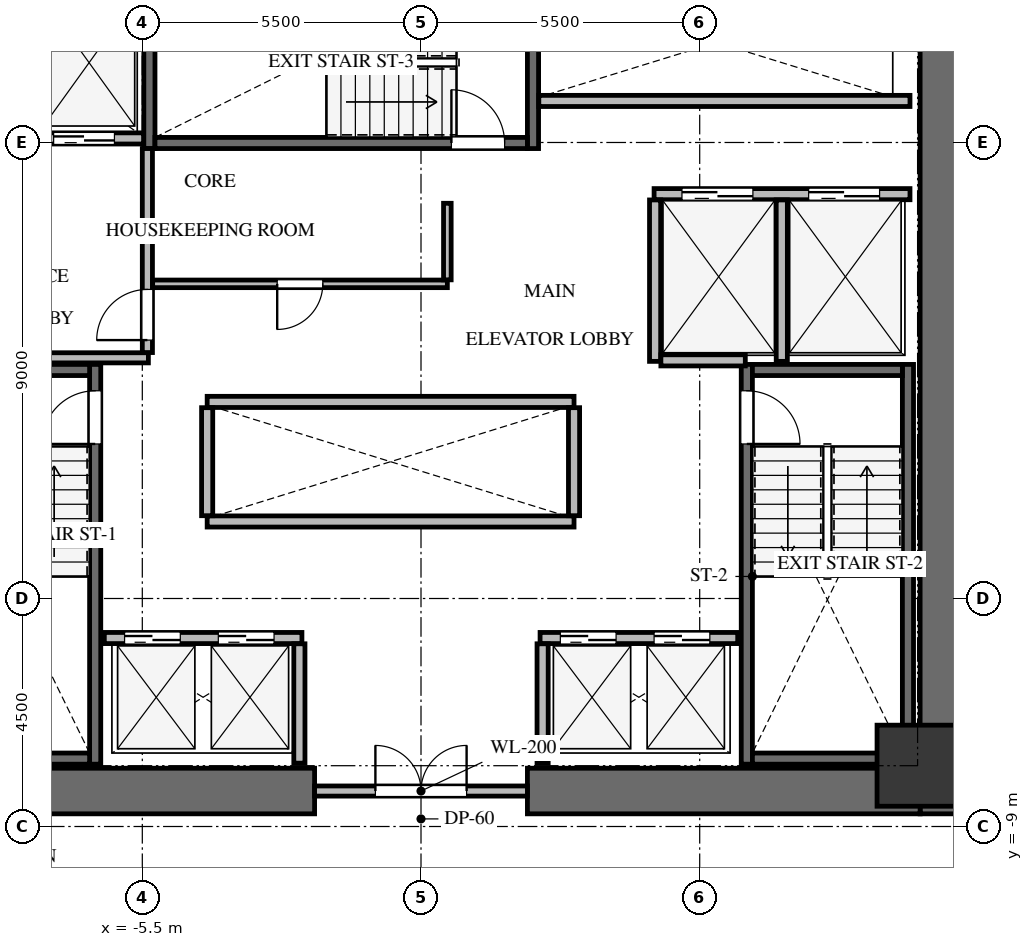
"""IFC4 building model, lengths in metres.
Left out: names, types, materials, properties, quantities, classifications, styles, units other than length and angle.
Written with IfcOpenShell. Run it as: python <this file> out.ifc"""

import sys

from ifc_helpers import new_model, si_unit, direction, frame, frame_2d, origin, origin_2d, place, context, subcontext, project, spatial, rectangle, extrude, source, transform, mapped, element, fill, save


model = new_model("IFC4")
c1 = context("Model", 3, precision=1e-05, world=origin(), true_north=direction((0.0, 1.0)))
c2 = subcontext(c1, "Body", "Model", "MODEL_VIEW")
j1 = project(units=[si_unit("LENGTHUNIT", "METRE"), si_unit("PLANEANGLEUNIT", "RADIAN")], contexts=[c1])
p1 = place(None, origin())
s1 = spatial("IfcSite", under=j1, at=p1, CompositionType="ELEMENT")
p2 = place(p1, origin())
s2 = spatial("IfcBuilding", under=s1, at=p2, CompositionType="ELEMENT")
p3 = place(p2, frame((0.0, 0.0, 72.0)))
s3 = spatial("IfcBuildingStorey", under=s2, at=p3, CompositionType="ELEMENT", Elevation=72.0)
p4 = place(p3, frame((10.3, -8.75, 0.0), z_axis=(0.0, 0.0, 1.0), x_axis=(0.0, 1.0, 0.0)))
e1 = element("IfcWall", 1, at=p4, inside=s3, PredefinedType="SHEAR", context=c2, shape_type="SweptSolid", body=[
    extrude(rectangle(XDim=17.5, YDim=0.9, at=frame_2d((8.75, 0.0))), origin(), (0.0, 0.0, 1.0), 3.3),
])
for number, where, z_axis, x_axis in (
    (2, (-9.85, -8.3, 0.0), (0.0, 0.0, 1.0), (1.0, 0.0, 0.0)),
    (3, (2.1, -8.3, 0.0), (0.0, 0.0, 1.0), (1.0, 0.0, 0.0)),
):
    element("IfcWall", number, at=place(p3, frame(where, z_axis=z_axis, x_axis=x_axis)), inside=s3, PredefinedType="SHEAR", context=c2, shape_type="SweptSolid", body=[
        extrude(rectangle(XDim=7.75, YDim=0.9, at=frame_2d((3.875, 0.0))), origin(), (0.0, 0.0, 1.0), 3.3),
    ])
p5 = place(p3, frame((-6.43, -7.77, -0.24), z_axis=(0.0, 0.0, 1.0), x_axis=(0.0, 1.0, 0.0)))
e4 = element("IfcWall", 4, at=p5, inside=s3, PredefinedType="SHEAR", context=c2, shape_type="SweptSolid", body=[
    extrude(rectangle(XDim=7.89, YDim=0.22, at=frame_2d((3.945, 0.0))), origin(), (0.0, 0.0, 1.0), 3.3),
])
p6 = place(p5, frame((6.32, 0.0, 0.0)))
e5 = element("IfcOpeningElement", 5, at=p6, cuts=e4, PredefinedType="OPENING", context=c2, shape_type="SweptSolid", body=[
    extrude(rectangle(XDim=1.05, YDim=2.15, at=frame_2d((0.525, 1.075))), frame((0.0, 0.12, 0.0), z_axis=(0.0, -1.0, 0.0), x_axis=(1.0, 0.0, 0.0)), (0.0, 0.0, 1.0), 0.24),
])
for number, where, z_axis, x_axis in (
    (6, (-9.5, -7.66, -0.24), (0.0, 0.0, 1.0), (1.0, 0.0, 0.0)),
    (7, (-6.54, 0.01, -0.24), (0.0, 0.0, 1.0), (-1.0, 0.0, 0.0)),
):
    element("IfcWall", number, at=place(p3, frame(where, z_axis=z_axis, x_axis=x_axis)), inside=s3, PredefinedType="SHEAR", context=c2, shape_type="SweptSolid", body=[
        extrude(rectangle(XDim=2.96, YDim=0.22, at=frame_2d((1.48, 0.0))), origin(), (0.0, 0.0, 1.0), 3.3),
    ])
p7 = place(p3, frame((9.61, -7.77, -0.24), z_axis=(0.0, 0.0, 1.0), x_axis=(0.0, 1.0, 0.0)))
e8 = element("IfcWall", 8, at=p7, inside=s3, PredefinedType="SHEAR", context=c2, shape_type="SweptSolid", body=[
    extrude(rectangle(XDim=7.89, YDim=0.22, at=frame_2d((3.945, 0.0))), origin(), (0.0, 0.0, 1.0), 3.3),
])
p8 = place(p3, frame((6.43, 0.12, -0.24), z_axis=(0.0, 0.0, 1.0), x_axis=(0.0, -1.0, 0.0)))
e9 = element("IfcWall", 9, at=p8, inside=s3, PredefinedType="SHEAR", context=c2, shape_type="SweptSolid", body=[
    extrude(rectangle(XDim=7.89, YDim=0.22, at=frame_2d((3.945, 0.0))), origin(), (0.0, 0.0, 1.0), 3.3),
])
p9 = place(p8, frame((0.52, 0.0, 0.0)))
e10 = element("IfcOpeningElement", 10, at=p9, cuts=e9, PredefinedType="OPENING", context=c2, shape_type="SweptSolid", body=[
    extrude(rectangle(XDim=1.05, YDim=2.15, at=frame_2d((0.525, 1.075))), frame((0.0, 0.12, 0.0), z_axis=(0.0, -1.0, 0.0), x_axis=(1.0, 0.0, 0.0)), (0.0, 0.0, 1.0), 0.24),
])
for number, where, z_axis, x_axis in (
    (11, (6.54, -7.66, -0.24), (0.0, 0.0, 1.0), (1.0, 0.0, 0.0)),
    (12, (9.5, 0.01, -0.24), (0.0, 0.0, 1.0), (-1.0, 0.0, 0.0)),
):
    element("IfcWall", number, at=place(p3, frame(where, z_axis=z_axis, x_axis=x_axis)), inside=s3, PredefinedType="SHEAR", context=c2, shape_type="SweptSolid", body=[
        extrude(rectangle(XDim=2.96, YDim=0.22, at=frame_2d((1.48, 0.0))), origin(), (0.0, 0.0, 1.0), 3.3),
    ])
for number, where, z_axis, x_axis in (
    (13, (2.21, 4.38, -0.24), (0.0, 0.0, 1.0), (0.0, 1.0, 0.0)),
    (14, (-5.36, 7.78, -0.24), (0.0, 0.0, 1.0), (0.0, -1.0, 0.0)),
):
    element("IfcWall", number, at=place(p3, frame(where, z_axis=z_axis, x_axis=x_axis)), inside=s3, PredefinedType="SHEAR", context=c2, shape_type="SweptSolid", body=[
        extrude(rectangle(XDim=3.4, YDim=0.22, at=frame_2d((1.7, 0.0))), origin(), (0.0, 0.0, 1.0), 3.3),
    ])
p10 = place(p3, frame((-5.25, 4.49, -0.24), z_axis=(0.0, 0.0, 1.0), x_axis=(1.0, 0.0, 0.0)))
e15 = element("IfcWall", 15, at=p10, inside=s3, PredefinedType="SHEAR", context=c2, shape_type="SweptSolid", body=[
    extrude(rectangle(XDim=7.35, YDim=0.22, at=frame_2d((3.675, 0.0))), origin(), (0.0, 0.0, 1.0), 3.3),
])
p11 = place(p10, frame((5.85, 0.0, 0.0)))
e16 = element("IfcOpeningElement", 16, at=p11, cuts=e15, PredefinedType="OPENING", context=c2, shape_type="SweptSolid", body=[
    extrude(rectangle(XDim=1.05, YDim=2.15, at=frame_2d((0.525, 1.075))), frame((0.0, 0.12, 0.0), z_axis=(0.0, -1.0, 0.0), x_axis=(1.0, 0.0, 0.0)), (0.0, 0.0, 1.0), 0.24),
])
m1 = source(origin(), c2, "Body", "SweptSolid", [
    extrude(rectangle(XDim=1.6, YDim=1.6, at=origin_2d()), origin(), (0.0, 0.0, 1.0), 3.3),
])
p12 = place(p3, frame((9.8, -7.8, -0.24), z_axis=(0.0, 0.0, 1.0), x_axis=(1.0, 0.0, 0.0)))
e17 = element("IfcColumn", 17, at=p12, inside=s3, PredefinedType="COLUMN", context=c2, shape_type="MappedRepresentation", body=[
    mapped(m1, transform((0.0, 0.0, 0.0), x_axis=(1.0, 0.0, 0.0), y_axis=(0.0, 1.0, 0.0), z_axis=(0.0, 0.0, 1.0), scale=1.0)),
])
p13 = place(p3, frame((-2.1, -8.3, 0.0), z_axis=(0.0, 0.0, 1.0), x_axis=(1.0, 0.0, 0.0)))
e18 = element("IfcWall", 18, at=p13, inside=s3, PredefinedType="SOLIDWALL", context=c2, shape_type="SweptSolid", body=[
    extrude(rectangle(XDim=4.2, YDim=0.2, at=frame_2d((2.1, 0.0))), origin(), (0.0, 0.0, 1.0), 3.045),
])
p14 = place(p13, frame((1.2, 0.0, 0.0)))
e19 = element("IfcOpeningElement", 19, at=p14, cuts=e18, PredefinedType="OPENING", context=c2, shape_type="SweptSolid", body=[
    extrude(rectangle(XDim=1.8, YDim=2.15, at=frame_2d((0.9, 1.075))), frame((0.0, 0.11, 0.0), z_axis=(0.0, -1.0, 0.0), x_axis=(1.0, 0.0, 0.0)), (0.0, 0.0, 1.0), 0.22),
])
p15 = place(p3, frame((-9.65, 4.58, 0.0), z_axis=(0.0, 0.0, 1.0), x_axis=(1.0, 0.0, 0.0)))
e20 = element("IfcWall", 20, at=p15, inside=s3, PredefinedType="SOLIDWALL", context=c2, shape_type="SweptSolid", body=[
    extrude(rectangle(XDim=4.175, YDim=0.22, at=frame_2d((2.087, 0.0))), origin(), (0.0, 0.0, 1.0), 3.045),
])
p16 = place(p15, frame((0.4, 0.0, 0.0)))
e21 = element("IfcOpeningElement", 21, at=p16, cuts=e20, PredefinedType="OPENING", context=c2, shape_type="SweptSolid", body=[
    extrude(rectangle(XDim=1.2, YDim=2.15, at=frame_2d((0.6, 1.075))), frame((0.0, 0.12, 0.0), z_axis=(0.0, -1.0, 0.0), x_axis=(1.0, 0.0, 0.0)), (0.0, 0.0, 1.0), 0.24),
])
p17 = place(p15, frame((2.4, 0.0, 0.0)))
e22 = element("IfcOpeningElement", 22, at=p17, cuts=e20, PredefinedType="OPENING", context=c2, shape_type="SweptSolid", body=[
    extrude(rectangle(XDim=1.2, YDim=2.15, at=frame_2d((0.6, 1.075))), frame((0.0, 0.12, 0.0), z_axis=(0.0, -1.0, 0.0), x_axis=(1.0, 0.0, 0.0)), (0.0, 0.0, 1.0), 0.24),
])
p18 = place(p3, frame((-9.65, 0.25, 0.0), z_axis=(0.0, 0.0, 1.0), x_axis=(1.0, 0.0, 0.0)))
e23 = element("IfcWall", 23, at=p18, inside=s3, PredefinedType="SOLIDWALL", context=c2, shape_type="SweptSolid", body=[
    extrude(rectangle(XDim=4.27, YDim=0.2, at=frame_2d((2.135, 0.0))), origin(), (0.0, 0.0, 1.0), 3.045),
])
p19 = place(p3, frame((-5.4, 0.354, 0.0), z_axis=(0.0, 0.0, 1.0), x_axis=(0.0, 1.0, 0.0)))
e24 = element("IfcWall", 24, at=p19, inside=s3, PredefinedType="SOLIDWALL", context=c2, shape_type="SweptSolid", body=[
    extrude(rectangle(XDim=4.026, YDim=0.2, at=frame_2d((2.013, 0.0))), origin(), (0.0, 0.0, 1.0), 3.045),
])
p20 = place(p19, frame((0.246, 0.0, 0.0)))
e25 = element("IfcOpeningElement", 25, at=p20, cuts=e24, PredefinedType="OPENING", context=c2, shape_type="SweptSolid", body=[
    extrude(rectangle(XDim=1.0, YDim=2.15, at=frame_2d((0.5, 1.075))), frame((0.0, 0.11, 0.0), z_axis=(0.0, -1.0, 0.0), x_axis=(1.0, 0.0, 0.0)), (0.0, 0.0, 1.0), 0.22),
])
p21 = place(p3, frame((4.6, 3.48, 0.0), z_axis=(0.0, 0.0, 1.0), x_axis=(1.0, 0.0, 0.0)))
e26 = element("IfcWall", 26, at=p21, inside=s3, PredefinedType="SOLIDWALL", context=c2, shape_type="SweptSolid", body=[
    extrude(rectangle(XDim=5.05, YDim=0.22, at=frame_2d((2.525, 0.0))), origin(), (0.0, 0.0, 1.0), 3.045),
])
p22 = place(p21, frame((0.55, 0.0, 0.0)))
e27 = element("IfcOpeningElement", 27, at=p22, cuts=e26, PredefinedType="OPENING", context=c2, shape_type="SweptSolid", body=[
    extrude(rectangle(XDim=1.4, YDim=2.15, at=frame_2d((0.7, 1.075))), frame((0.0, 0.12, 0.0), z_axis=(0.0, -1.0, 0.0), x_axis=(1.0, 0.0, 0.0)), (0.0, 0.0, 1.0), 0.24),
])
p23 = place(p21, frame((3.05, 0.0, 0.0)))
e28 = element("IfcOpeningElement", 28, at=p23, cuts=e26, PredefinedType="OPENING", context=c2, shape_type="SweptSolid", body=[
    extrude(rectangle(XDim=1.4, YDim=2.15, at=frame_2d((0.7, 1.075))), frame((0.0, 0.12, 0.0), z_axis=(0.0, -1.0, 0.0), x_axis=(1.0, 0.0, 0.0)), (0.0, 0.0, 1.0), 0.24),
])
for number, where, z_axis, x_axis in (
    (29, (4.62, 0.18, 0.0), (0.0, 0.0, 1.0), (0.0, 1.0, 0.0)),
    (30, (7.12, 0.18, 0.0), (0.0, 0.0, 1.0), (0.0, 1.0, 0.0)),
):
    element("IfcWall", number, at=place(p3, frame(where, z_axis=z_axis, x_axis=x_axis)), inside=s3, PredefinedType="SOLIDWALL", context=c2, shape_type="SweptSolid", body=[
        extrude(rectangle(XDim=3.186, YDim=0.22, at=frame_2d((1.593, 0.0))), origin(), (0.0, 0.0, 1.0), 3.045),
    ])
p24 = place(p3, frame((4.734, 0.2, 0.0), z_axis=(0.0, 0.0, 1.0), x_axis=(1.0, 0.0, 0.0)))
e31 = element("IfcWall", 31, at=p24, inside=s3, PredefinedType="SOLIDWALL", context=c2, shape_type="SweptSolid", body=[
    extrude(rectangle(XDim=1.666, YDim=0.22, at=frame_2d((0.833, 0.0))), origin(), (0.0, 0.0, 1.0), 3.045),
])
p25 = place(p3, frame((-6.25, -5.28, 0.0), z_axis=(0.0, 0.0, 1.0), x_axis=(1.0, 0.0, 0.0)))
e32 = element("IfcWall", 32, at=p25, inside=s3, PredefinedType="SOLIDWALL", context=c2, shape_type="SweptSolid", body=[
    extrude(rectangle(XDim=3.9, YDim=0.22, at=frame_2d((1.95, 0.0))), origin(), (0.0, 0.0, 1.0), 3.045),
])
p26 = place(p25, frame((0.4, 0.0, 0.0)))
e33 = element("IfcOpeningElement", 33, at=p26, cuts=e32, PredefinedType="OPENING", context=c2, shape_type="SweptSolid", body=[
    extrude(rectangle(XDim=1.1, YDim=2.15, at=frame_2d((0.55, 1.075))), frame((0.0, 0.12, 0.0), z_axis=(0.0, -1.0, 0.0), x_axis=(1.0, 0.0, 0.0)), (0.0, 0.0, 1.0), 0.24),
])
p27 = place(p25, frame((2.25, 0.0, 0.0)))
e34 = element("IfcOpeningElement", 34, at=p27, cuts=e32, PredefinedType="OPENING", context=c2, shape_type="SweptSolid", body=[
    extrude(rectangle(XDim=1.1, YDim=2.15, at=frame_2d((0.55, 1.075))), frame((0.0, 0.12, 0.0), z_axis=(0.0, -1.0, 0.0), x_axis=(1.0, 0.0, 0.0)), (0.0, 0.0, 1.0), 0.24),
])
p28 = place(p3, frame((2.35, -5.28, 0.0), z_axis=(0.0, 0.0, 1.0), x_axis=(1.0, 0.0, 0.0)))
e35 = element("IfcWall", 35, at=p28, inside=s3, PredefinedType="SOLIDWALL", context=c2, shape_type="SweptSolid", body=[
    extrude(rectangle(XDim=3.9, YDim=0.22, at=frame_2d((1.95, 0.0))), origin(), (0.0, 0.0, 1.0), 3.045),
])
p29 = place(p28, frame((0.4, 0.0, 0.0)))
e36 = element("IfcOpeningElement", 36, at=p29, cuts=e35, PredefinedType="OPENING", context=c2, shape_type="SweptSolid", body=[
    extrude(rectangle(XDim=1.1, YDim=2.15, at=frame_2d((0.55, 1.075))), frame((0.0, 0.12, 0.0), z_axis=(0.0, -1.0, 0.0), x_axis=(1.0, 0.0, 0.0)), (0.0, 0.0, 1.0), 0.24),
])
p30 = place(p28, frame((2.25, 0.0, 0.0)))
e37 = element("IfcOpeningElement", 37, at=p30, cuts=e35, PredefinedType="OPENING", context=c2, shape_type="SweptSolid", body=[
    extrude(rectangle(XDim=1.1, YDim=2.15, at=frame_2d((0.55, 1.075))), frame((0.0, 0.12, 0.0), z_axis=(0.0, -1.0, 0.0), x_axis=(1.0, 0.0, 0.0)), (0.0, 0.0, 1.0), 0.24),
])
for number, where, z_axis, x_axis in (
    (38, (-2.4, -7.75, 0.0), (0.0, 0.0, 1.0), (0.0, 1.0, 0.0)),
    (39, (2.4, -7.75, 0.0), (0.0, 0.0, 1.0), (0.0, 1.0, 0.0)),
):
    element("IfcWall", number, at=place(p3, frame(where, z_axis=z_axis, x_axis=x_axis)), inside=s3, PredefinedType="SOLIDWALL", context=c2, shape_type="SweptSolid", body=[
        extrude(rectangle(XDim=2.356, YDim=0.22, at=frame_2d((1.178, 0.0))), origin(), (0.0, 0.0, 1.0), 3.045),
    ])
for number, where, z_axis, x_axis in (
    (40, (-4.22, -2.98, 0.0), (0.0, 0.0, 1.0), (1.0, 0.0, 0.0)),
    (41, (-4.22, -0.62, 0.0), (0.0, 0.0, 1.0), (1.0, 0.0, 0.0)),
):
    element("IfcWall", number, at=place(p3, frame(where, z_axis=z_axis, x_axis=x_axis)), inside=s3, PredefinedType="SOLIDWALL", context=c2, shape_type="SweptSolid", body=[
        extrude(rectangle(XDim=7.24, YDim=0.22, at=frame_2d((3.62, 0.0))), origin(), (0.0, 0.0, 1.0), 3.045),
    ])
for number, where, z_axis, x_axis in (
    (42, (-4.22, -2.866, 0.0), (0.0, 0.0, 1.0), (0.0, 1.0, 0.0)),
    (43, (3.02, -2.866, 0.0), (0.0, 0.0, 1.0), (0.0, 1.0, 0.0)),
):
    element("IfcWall", number, at=place(p3, frame(where, z_axis=z_axis, x_axis=x_axis)), inside=s3, PredefinedType="SOLIDWALL", context=c2, shape_type="SweptSolid", body=[
        extrude(rectangle(XDim=2.132, YDim=0.22, at=frame_2d((1.066, 0.0))), origin(), (0.0, 0.0, 1.0), 3.045),
    ])
p31 = place(p3, frame((2.325, 5.32, 0.0), z_axis=(0.0, 0.0, 1.0), x_axis=(1.0, 0.0, 0.0)))
e44 = element("IfcWall", 44, at=p31, inside=s3, PredefinedType="SOLIDWALL", context=c2, shape_type="SweptSolid", body=[
    extrude(rectangle(XDim=7.325, YDim=0.22, at=frame_2d((3.663, 0.0))), origin(), (0.0, 0.0, 1.0), 3.045),
])
p32 = place(p3, frame((0.52, 1.71, 0.0), z_axis=(0.0, 0.0, 1.0), x_axis=(-1.0, 0.0, 0.0)))
e45 = element("IfcWall", 45, at=p32, inside=s3, PredefinedType="PARTITIONING", context=c2, shape_type="SweptSolid", body=[
    extrude(rectangle(XDim=5.816, YDim=0.15, at=frame_2d((2.908, 0.0))), origin(), (0.0, 0.0, 1.0), 3.045),
])
p33 = place(p32, frame((2.458, 0.0, 0.0)))
e46 = element("IfcOpeningElement", 46, at=p33, cuts=e45, PredefinedType="OPENING", context=c2, shape_type="SweptSolid", body=[
    extrude(rectangle(XDim=0.9, YDim=2.05, at=frame_2d((0.45, 1.025))), frame((0.0, 0.085, 0.0), z_axis=(0.0, -1.0, 0.0), x_axis=(1.0, 0.0, 0.0)), (0.0, 0.0, 1.0), 0.17),
])
p34 = place(p3, frame((0.52, 3.3, 0.0), z_axis=(0.0, 0.0, 1.0), x_axis=(0.0, -1.0, 0.0)))
e47 = element("IfcWall", 47, at=p34, inside=s3, PredefinedType="PARTITIONING", context=c2, shape_type="SweptSolid", body=[
    extrude(rectangle(XDim=1.511, YDim=0.15, at=frame_2d((0.755, 0.0))), origin(), (0.0, 0.0, 1.0), 3.045),
])
m2 = source(origin(), c2, "Body", "SweptSolid", [
    extrude(rectangle(XDim=1.05, YDim=2.15, at=frame_2d((0.525, 1.075))), frame((0.0, 0.025, 0.0), z_axis=(0.0, -1.0, 0.0), x_axis=(1.0, 0.0, 0.0)), (0.0, 0.0, 1.0), 0.05),
])
p35 = place(p6, origin())
e48 = element("IfcDoor", 48, at=p35, inside=s3, OperationType="SINGLE_SWING_LEFT", PredefinedType="DOOR", context=c2, shape_type="MappedRepresentation", body=[
    mapped(m2, transform((0.0, 0.0, 0.0), x_axis=(1.0, 0.0, 0.0), y_axis=(0.0, 1.0, 0.0), z_axis=(0.0, 0.0, 1.0), scale=1.0)),
])
fill(e5, e48)
m3 = source(origin(), c2, "Body", "SweptSolid", [
    extrude(rectangle(XDim=1.05, YDim=2.15, at=frame_2d((0.525, 1.075))), frame((0.0, 0.025, 0.0), z_axis=(0.0, -1.0, 0.0), x_axis=(1.0, 0.0, 0.0)), (0.0, 0.0, 1.0), 0.05),
])
p36 = place(p9, origin())
e49 = element("IfcDoor", 49, at=p36, inside=s3, OperationType="SINGLE_SWING_RIGHT", PredefinedType="DOOR", context=c2, shape_type="MappedRepresentation", body=[
    mapped(m3, transform((0.0, 0.0, 0.0), x_axis=(1.0, 0.0, 0.0), y_axis=(0.0, 1.0, 0.0), z_axis=(0.0, 0.0, 1.0), scale=1.0)),
])
fill(e10, e49)
p37 = place(p11, origin())
e50 = element("IfcDoor", 50, at=p37, inside=s3, OperationType="SINGLE_SWING_LEFT", PredefinedType="DOOR", context=c2, shape_type="MappedRepresentation", body=[
    mapped(m2, transform((0.0, 0.0, 0.0), x_axis=(1.0, 0.0, 0.0), y_axis=(0.0, 1.0, 0.0), z_axis=(0.0, 0.0, 1.0), scale=1.0)),
])
fill(e16, e50)
m4 = source(origin(), c2, "Body", "SweptSolid", [
    extrude(rectangle(XDim=1.8, YDim=2.15, at=frame_2d((0.9, 1.075))), frame((0.0, 0.025, 0.0), z_axis=(0.0, -1.0, 0.0), x_axis=(1.0, 0.0, 0.0)), (0.0, 0.0, 1.0), 0.05),
])
p38 = place(p14, origin())
e51 = element("IfcDoor", 51, at=p38, inside=s3, OperationType="DOUBLE_DOOR_SINGLE_SWING", PredefinedType="DOOR", context=c2, shape_type="MappedRepresentation", body=[
    mapped(m4, transform((0.0, 0.0, 0.0), x_axis=(1.0, 0.0, 0.0), y_axis=(0.0, 1.0, 0.0), z_axis=(0.0, 0.0, 1.0), scale=1.0)),
])
fill(e19, e51)
m5 = source(origin(), c2, "Body", "SweptSolid", [
    extrude(rectangle(XDim=1.2, YDim=2.15, at=frame_2d((0.6, 1.075))), frame((0.0, 0.025, 0.0), z_axis=(0.0, -1.0, 0.0), x_axis=(1.0, 0.0, 0.0)), (0.0, 0.0, 1.0), 0.05),
])
p39 = place(p17, origin())
e52 = element("IfcDoor", 52, at=p39, inside=s3, OperationType="DOUBLE_DOOR_SLIDING", PredefinedType="DOOR", context=c2, shape_type="MappedRepresentation", body=[
    mapped(m5, transform((0.0, 0.0, 0.0), x_axis=(1.0, 0.0, 0.0), y_axis=(0.0, 1.0, 0.0), z_axis=(0.0, 0.0, 1.0), scale=1.0)),
])
fill(e22, e52)
m6 = source(origin(), c2, "Body", "SweptSolid", [
    extrude(rectangle(XDim=1.0, YDim=2.15, at=frame_2d((0.5, 1.075))), frame((0.0, 0.025, 0.0), z_axis=(0.0, -1.0, 0.0), x_axis=(1.0, 0.0, 0.0)), (0.0, 0.0, 1.0), 0.05),
])
p40 = place(p20, origin())
e53 = element("IfcDoor", 53, at=p40, inside=s3, OperationType="SINGLE_SWING_LEFT", PredefinedType="DOOR", context=c2, shape_type="MappedRepresentation", body=[
    mapped(m6, transform((0.0, 0.0, 0.0), x_axis=(1.0, 0.0, 0.0), y_axis=(0.0, 1.0, 0.0), z_axis=(0.0, 0.0, 1.0), scale=1.0)),
])
fill(e25, e53)
m7 = source(origin(), c2, "Body", "SweptSolid", [
    extrude(rectangle(XDim=1.4, YDim=2.15, at=frame_2d((0.7, 1.075))), frame((0.0, 0.025, 0.0), z_axis=(0.0, -1.0, 0.0), x_axis=(1.0, 0.0, 0.0)), (0.0, 0.0, 1.0), 0.05),
])
p41 = place(p22, origin())
e54 = element("IfcDoor", 54, at=p41, inside=s3, OperationType="DOUBLE_DOOR_SLIDING", PredefinedType="DOOR", context=c2, shape_type="MappedRepresentation", body=[
    mapped(m7, transform((0.0, 0.0, 0.0), x_axis=(1.0, 0.0, 0.0), y_axis=(0.0, 1.0, 0.0), z_axis=(0.0, 0.0, 1.0), scale=1.0)),
])
fill(e27, e54)
p42 = place(p23, origin())
e55 = element("IfcDoor", 55, at=p42, inside=s3, OperationType="DOUBLE_DOOR_SLIDING", PredefinedType="DOOR", context=c2, shape_type="MappedRepresentation", body=[
    mapped(m7, transform((0.0, 0.0, 0.0), x_axis=(1.0, 0.0, 0.0), y_axis=(0.0, 1.0, 0.0), z_axis=(0.0, 0.0, 1.0), scale=1.0)),
])
fill(e28, e55)
m8 = source(origin(), c2, "Body", "SweptSolid", [
    extrude(rectangle(XDim=1.1, YDim=2.15, at=frame_2d((0.55, 1.075))), frame((0.0, 0.025, 0.0), z_axis=(0.0, -1.0, 0.0), x_axis=(1.0, 0.0, 0.0)), (0.0, 0.0, 1.0), 0.05),
])
p43 = place(p26, origin())
e56 = element("IfcDoor", 56, at=p43, inside=s3, OperationType="DOUBLE_DOOR_SLIDING", PredefinedType="DOOR", context=c2, shape_type="MappedRepresentation", body=[
    mapped(m8, transform((0.0, 0.0, 0.0), x_axis=(1.0, 0.0, 0.0), y_axis=(0.0, 1.0, 0.0), z_axis=(0.0, 0.0, 1.0), scale=1.0)),
])
fill(e33, e56)
p44 = place(p27, origin())
e57 = element("IfcDoor", 57, at=p44, inside=s3, OperationType="DOUBLE_DOOR_SLIDING", PredefinedType="DOOR", context=c2, shape_type="MappedRepresentation", body=[
    mapped(m8, transform((0.0, 0.0, 0.0), x_axis=(1.0, 0.0, 0.0), y_axis=(0.0, 1.0, 0.0), z_axis=(0.0, 0.0, 1.0), scale=1.0)),
])
fill(e34, e57)
p45 = place(p29, origin())
e58 = element("IfcDoor", 58, at=p45, inside=s3, OperationType="DOUBLE_DOOR_SLIDING", PredefinedType="DOOR", context=c2, shape_type="MappedRepresentation", body=[
    mapped(m8, transform((0.0, 0.0, 0.0), x_axis=(1.0, 0.0, 0.0), y_axis=(0.0, 1.0, 0.0), z_axis=(0.0, 0.0, 1.0), scale=1.0)),
])
fill(e36, e58)
p46 = place(p30, origin())
e59 = element("IfcDoor", 59, at=p46, inside=s3, OperationType="DOUBLE_DOOR_SLIDING", PredefinedType="DOOR", context=c2, shape_type="MappedRepresentation", body=[
    mapped(m8, transform((0.0, 0.0, 0.0), x_axis=(1.0, 0.0, 0.0), y_axis=(0.0, 1.0, 0.0), z_axis=(0.0, 0.0, 1.0), scale=1.0)),
])
fill(e37, e59)
m9 = source(origin(), c2, "Body", "SweptSolid", [
    extrude(rectangle(XDim=0.9, YDim=2.05, at=frame_2d((0.45, 1.025))), frame((0.0, 0.025, 0.0), z_axis=(0.0, -1.0, 0.0), x_axis=(1.0, 0.0, 0.0)), (0.0, 0.0, 1.0), 0.05),
])
p47 = place(p33, origin())
e60 = element("IfcDoor", 60, at=p47, inside=s3, OperationType="SINGLE_SWING_RIGHT", PredefinedType="DOOR", context=c2, shape_type="MappedRepresentation", body=[
    mapped(m9, transform((0.0, 0.0, 0.0), x_axis=(1.0, 0.0, 0.0), y_axis=(0.0, 1.0, 0.0), z_axis=(0.0, 0.0, 1.0), scale=1.0)),
])
fill(e46, e60)
save(model, sys.argv[1])
